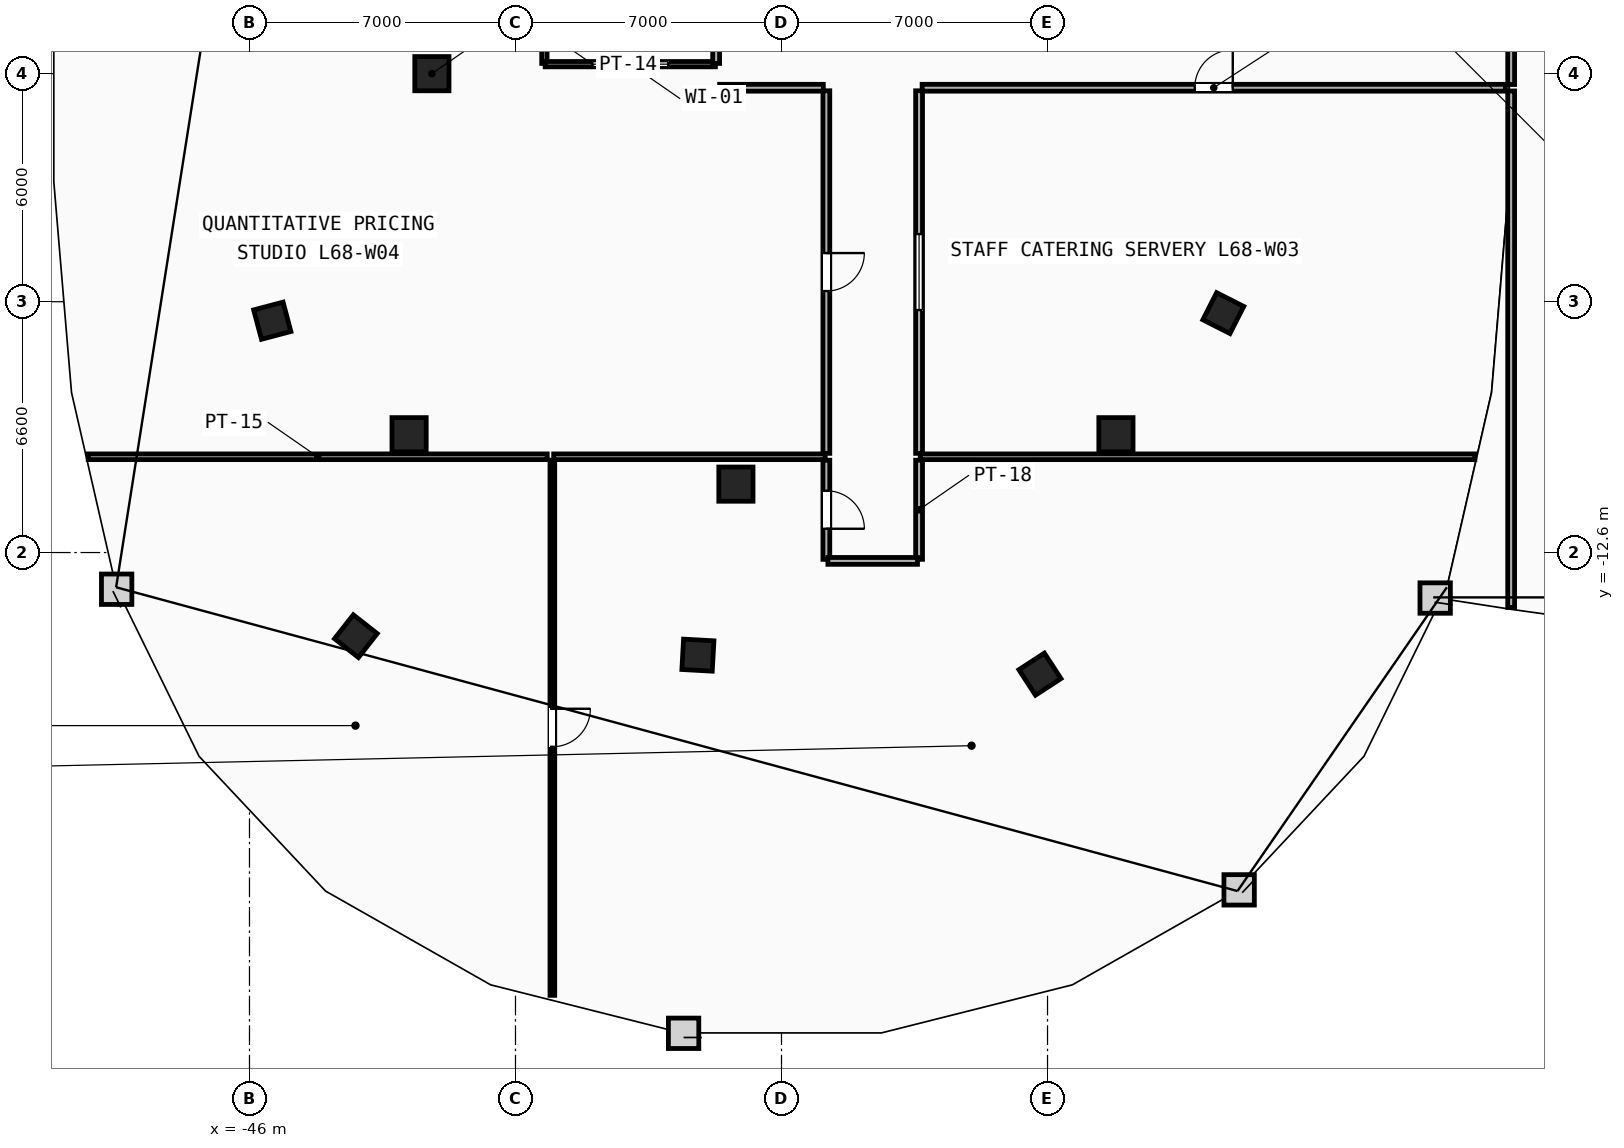
"""IFC4 building model, lengths in metres.
Left out: names, types, materials, properties, quantities, classifications, styles, units other than length and angle.
Written with IfcOpenShell. Run it as: python <this file> out.ifc"""

import sys

from ifc_helpers import new_model, si_unit, direction, frame, frame_2d, origin, origin_2d, place, context, subcontext, project, spatial, rectangle, extrude, element, fill, save


model = new_model("IFC4")
c1 = context("Model", 3, precision=1e-05, world=origin(), true_north=direction((0.0, 1.0)))
c2 = subcontext(c1, "Body", "Model", "MODEL_VIEW")
j1 = project(units=[si_unit("LENGTHUNIT", "METRE"), si_unit("PLANEANGLEUNIT", "RADIAN")], contexts=[c1])
p1 = place(None, origin())
s1 = spatial("IfcSite", under=j1, at=p1, CompositionType="ELEMENT")
p2 = place(p1, origin())
s2 = spatial("IfcBuilding", under=s1, at=p2, CompositionType="ELEMENT")
p3 = place(p2, frame((0.0, 0.0, 257.6)))
s3 = spatial("IfcBuildingStorey", under=s2, at=p3, CompositionType="ELEMENT", Elevation=257.6)
for number, where, z_axis, x_axis in (
    (1, (-41.2, 0.0, 0.0), (0.0, 0.0, 1.0), (1.0, 0.0, 0.0)),
    (2, (-41.8, -9.5, 0.0), (0.0, 0.0, 1.0), (1.0, 0.0, 0.0)),
    (3, (-33.2, -10.8, 0.0), (0.0, 0.0, 1.0), (1.0, 0.0, 0.0)),
    (4, (-23.2, -9.5, 0.0), (0.0, 0.0, 1.0), (1.0, 0.0, 0.0)),
):
    element("IfcColumn", number, at=place(p3, frame(where, z_axis=z_axis, x_axis=x_axis)), inside=s3, PredefinedType="COLUMN", context=c2, shape_type="SweptSolid", body=[
        extrude(rectangle(XDim=0.9, YDim=0.9, at=origin_2d()), origin(), (0.0, 0.0, 1.0), 3.6),
    ])
for number, where, z_axis, x_axis in (
    (5, (-45.4, -6.5, 0.0), (0.0, 0.0, 1.0), (0.256, -0.967, 0.0)),
    (6, (-43.2, -14.8, 0.0), (0.0, 0.0, 1.0), (0.786, -0.618, 0.0)),
    (7, (-34.2, -15.3, 0.0), (0.0, 0.0, 1.0), (0.998, -0.055, 0.0)),
    (8, (-25.2, -15.8, 0.0), (0.0, 0.0, 1.0), (0.838, 0.546, 0.0)),
    (9, (-20.375, -6.3, 0.0), (0.0, 0.0, 1.0), (0.453, 0.892, 0.0)),
):
    element("IfcColumn", number, at=place(p3, frame(where, z_axis=z_axis, x_axis=x_axis)), inside=s3, PredefinedType="COLUMN", context=c2, shape_type="SweptSolid", body=[
        extrude(rectangle(XDim=0.8, YDim=0.8, at=origin_2d()), origin(), (0.0, 0.0, 1.0), 3.6),
    ])
p4 = place(p3, frame((-38.24, 0.27, 0.0), z_axis=(0.0, 0.0, 1.0), x_axis=(0.0, 1.0, 0.0)))
e10 = element("IfcWall", 10, at=p4, inside=s3, PredefinedType="PARTITIONING", context=c2, shape_type="SweptSolid", body=[
    extrude(rectangle(XDim=1.715, YDim=0.14, at=frame_2d((0.857, 0.0))), origin(), (0.0, 0.0, 1.0), 3.34),
])
p5 = place(p3, frame((-38.22, 0.25, 0.0), z_axis=(0.0, 0.0, 1.0), x_axis=(1.0, 0.0, 0.0)))
e11 = element("IfcWall", 11, at=p5, inside=s3, PredefinedType="PARTITIONING", context=c2, shape_type="SweptSolid", body=[
    extrude(rectangle(XDim=4.48, YDim=0.14, at=frame_2d((2.24, 0.0))), origin(), (0.0, 0.0, 1.0), 3.34),
])
p6 = place(p5, frame((1.24, 0.0, 1.05)))
e12 = element("IfcOpeningElement", 12, at=p6, cuts=e11, PredefinedType="OPENING", context=c2, shape_type="SweptSolid", body=[
    extrude(rectangle(XDim=2.0, YDim=1.5, at=frame_2d((1.0, 0.75))), frame((0.0, 0.08, 0.0), z_axis=(0.0, -1.0, 0.0), x_axis=(1.0, 0.0, 0.0)), (0.0, 0.0, 1.0), 0.16),
])
p7 = place(p3, frame((-33.72, 0.27, 0.0), z_axis=(0.0, 0.0, 1.0), x_axis=(0.0, 1.0, 0.0)))
e13 = element("IfcWall", 13, at=p7, inside=s3, PredefinedType="PARTITIONING", context=c2, shape_type="SweptSolid", body=[
    extrude(rectangle(XDim=4.26, YDim=0.18, at=frame_2d((2.13, 0.0))), origin(), (0.0, 0.0, 1.0), 3.34),
])
p8 = place(p7, frame((1.655, 0.0, 0.0)))
e14 = element("IfcOpeningElement", 14, at=p8, cuts=e13, PredefinedType="OPENING", context=c2, shape_type="SweptSolid", body=[
    extrude(rectangle(XDim=0.95, YDim=2.1, at=frame_2d((0.475, 1.05))), frame((0.0, 0.1, 0.0), z_axis=(0.0, -1.0, 0.0), x_axis=(1.0, 0.0, 0.0)), (0.0, 0.0, 1.0), 0.2),
])
p9 = place(p3, frame((-50.245, -10.08, 0.0), z_axis=(0.0, 0.0, 1.0), x_axis=(1.0, 0.0, 0.0)))
e15 = element("IfcWall", 15, at=p9, inside=s3, PredefinedType="PARTITIONING", context=c2, shape_type="SweptSolid", body=[
    extrude(rectangle(XDim=12.08, YDim=0.15, at=frame_2d((6.04, 0.0))), origin(), (0.0, 0.0, 1.0), 2.724),
])
p10 = place(p3, frame((-37.995, -10.08, 0.0), z_axis=(0.0, 0.0, 1.0), x_axis=(1.0, 0.0, 0.0)))
e16 = element("IfcWall", 16, at=p10, inside=s3, PredefinedType="PARTITIONING", context=c2, shape_type="SweptSolid", body=[
    extrude(rectangle(XDim=7.145, YDim=0.15, at=frame_2d((3.573, 0.0))), origin(), (0.0, 0.0, 1.0), 2.724),
])
p11 = place(p3, frame((-28.35, -10.08, 0.0), z_axis=(0.0, 0.0, 1.0), x_axis=(1.0, 0.0, 0.0)))
e17 = element("IfcWall", 17, at=p11, inside=s3, PredefinedType="PARTITIONING", context=c2, shape_type="SweptSolid", body=[
    extrude(rectangle(XDim=14.595, YDim=0.15, at=frame_2d((7.297, 0.0))), origin(), (0.0, 0.0, 1.0), 2.724),
])
p12 = place(p3, frame((-30.82, -10.17, 0.0), z_axis=(0.0, 0.0, 1.0), x_axis=(0.0, -1.0, 0.0)))
e18 = element("IfcWall", 18, at=p12, inside=s3, PredefinedType="PARTITIONING", context=c2, shape_type="SweptSolid", body=[
    extrude(rectangle(XDim=2.609, YDim=0.18, at=frame_2d((1.304, 0.0))), origin(), (0.0, 0.0, 1.0), 3.34),
])
p13 = place(p12, frame((0.804, 0.0, 0.0)))
e19 = element("IfcOpeningElement", 19, at=p13, cuts=e18, PredefinedType="OPENING", context=c2, shape_type="SweptSolid", body=[
    extrude(rectangle(XDim=1.0, YDim=2.15, at=frame_2d((0.5, 1.075))), frame((0.0, 0.1, 0.0), z_axis=(0.0, -1.0, 0.0), x_axis=(1.0, 0.0, 0.0)), (0.0, 0.0, 1.0), 0.2),
])
p14 = place(p3, frame((-28.38, -12.779, 0.0), z_axis=(0.0, 0.0, 1.0), x_axis=(0.0, 1.0, 0.0)))
e20 = element("IfcWall", 20, at=p14, inside=s3, PredefinedType="PARTITIONING", context=c2, shape_type="SweptSolid", body=[
    extrude(rectangle(XDim=2.609, YDim=0.18, at=frame_2d((1.304, 0.0))), origin(), (0.0, 0.0, 1.0), 3.34),
])
p15 = place(p3, frame((-30.779, -12.82, 0.0), z_axis=(0.0, 0.0, 1.0), x_axis=(1.0, 0.0, 0.0)))
e21 = element("IfcWall", 21, at=p15, inside=s3, PredefinedType="PARTITIONING", context=c2, shape_type="SweptSolid", body=[
    extrude(rectangle(XDim=2.357, YDim=0.18, at=frame_2d((1.179, 0.0))), origin(), (0.0, 0.0, 1.0), 3.34),
])
p16 = place(p3, frame((-28.3, -0.37, 0.0), z_axis=(0.0, 0.0, 1.0), x_axis=(1.0, 0.0, 0.0)))
e22 = element("IfcWall", 22, at=p16, inside=s3, PredefinedType="PARTITIONING", context=c2, shape_type="SweptSolid", body=[
    extrude(rectangle(XDim=15.349, YDim=0.18, at=frame_2d((7.675, 0.0))), origin(), (0.0, 0.0, 1.0), 3.34),
])
p17 = place(p16, frame((7.175, 0.0, 0.0)))
e23 = element("IfcOpeningElement", 23, at=p17, cuts=e22, PredefinedType="OPENING", context=c2, shape_type="SweptSolid", body=[
    extrude(rectangle(XDim=1.0, YDim=2.15, at=frame_2d((0.5, 1.075))), frame((0.0, 0.1, 0.0), z_axis=(0.0, -1.0, 0.0), x_axis=(1.0, 0.0, 0.0)), (0.0, 0.0, 1.0), 0.2),
])
p18 = place(p3, frame((-28.38, -9.99, 0.0), z_axis=(0.0, 0.0, 1.0), x_axis=(0.0, 1.0, 0.0)))
e24 = element("IfcWall", 24, at=p18, inside=s3, PredefinedType="PARTITIONING", context=c2, shape_type="SweptSolid", body=[
    extrude(rectangle(XDim=9.54, YDim=0.18, at=frame_2d((4.77, 0.0))), origin(), (0.0, 0.0, 1.0), 3.34),
])
p19 = place(p18, frame((3.77, 0.0, 1.05)))
e25 = element("IfcOpeningElement", 25, at=p19, cuts=e24, PredefinedType="OPENING", context=c2, shape_type="SweptSolid", body=[
    extrude(rectangle(XDim=2.0, YDim=1.5, at=frame_2d((1.0, 0.75))), frame((0.0, 0.1, 0.0), z_axis=(0.0, -1.0, 0.0), x_axis=(1.0, 0.0, 0.0)), (0.0, 0.0, 1.0), 0.2),
])
p20 = place(p3, frame((-30.82, -0.45, 0.0), z_axis=(0.0, 0.0, 1.0), x_axis=(0.0, -1.0, 0.0)))
e26 = element("IfcWall", 26, at=p20, inside=s3, PredefinedType="PARTITIONING", context=c2, shape_type="SweptSolid", body=[
    extrude(rectangle(XDim=9.54, YDim=0.18, at=frame_2d((4.77, 0.0))), origin(), (0.0, 0.0, 1.0), 3.34),
])
p21 = place(p20, frame((4.27, 0.0, 0.0)))
e27 = element("IfcOpeningElement", 27, at=p21, cuts=e26, PredefinedType="OPENING", context=c2, shape_type="SweptSolid", body=[
    extrude(rectangle(XDim=1.0, YDim=2.15, at=frame_2d((0.5, 1.075))), frame((0.0, 0.1, 0.0), z_axis=(0.0, -1.0, 0.0), x_axis=(1.0, 0.0, 0.0)), (0.0, 0.0, 1.0), 0.2),
])
p22 = place(p3, frame((-33.628, -0.37, 0.0), z_axis=(0.0, 0.0, 1.0), x_axis=(1.0, 0.0, 0.0)))
e28 = element("IfcWall", 28, at=p22, inside=s3, PredefinedType="PARTITIONING", context=c2, shape_type="SweptSolid", body=[
    extrude(rectangle(XDim=2.729, YDim=0.18, at=frame_2d((1.364, 0.0))), origin(), (0.0, 0.0, 1.0), 3.34),
])
p23 = place(p3, frame((-38.03, -10.17, 0.0), z_axis=(0.0, 0.0, 1.0), x_axis=(0.0, -1.0, 0.0)))
e29 = element("IfcWall", 29, at=p23, inside=s3, PredefinedType="PARTITIONING", context=c2, shape_type="SweptSolid", body=[
    extrude(rectangle(XDim=14.081, YDim=0.125, at=frame_2d((7.041, 0.0))), origin(), (0.0, 0.0, 1.0), 3.34),
])
p24 = place(p23, frame((6.541, 0.0, 0.0)))
e30 = element("IfcOpeningElement", 30, at=p24, cuts=e29, PredefinedType="OPENING", context=c2, shape_type="SweptSolid", body=[
    extrude(rectangle(XDim=1.0, YDim=2.15, at=frame_2d((0.5, 1.075))), frame((0.0, 0.073, 0.0), z_axis=(0.0, -1.0, 0.0), x_axis=(1.0, 0.0, 0.0)), (0.0, 0.0, 1.0), 0.145),
])
p25 = place(p3, frame((-12.8, -14.044, 0.0), z_axis=(0.0, 0.0, 1.0), x_axis=(0.0, 1.0, 0.0)))
e31 = element("IfcWall", 31, at=p25, inside=s3, PredefinedType="PARTITIONING", context=c2, shape_type="SweptSolid", body=[
    extrude(rectangle(XDim=13.589, YDim=0.18, at=frame_2d((6.794, 0.0))), origin(), (0.0, 0.0, 1.0), 3.34),
])
p26 = place(p3, frame((-12.8, -0.285, 0.0), z_axis=(0.0, 0.0, 1.0), x_axis=(0.0, 1.0, 0.0)))
e32 = element("IfcWall", 32, at=p26, inside=s3, PredefinedType="PARTITIONING", context=c2, shape_type="SweptSolid", body=[
    extrude(rectangle(XDim=1.445, YDim=0.18, at=frame_2d((0.722, 0.0))), origin(), (0.0, 0.0, 1.0), 3.34),
])
p27 = place(p17, origin())
e33 = element("IfcDoor", 33, at=p27, inside=s3, OperationType="SINGLE_SWING_RIGHT", PredefinedType="DOOR", context=c2, shape_type="SweptSolid", body=[
    extrude(rectangle(XDim=1.0, YDim=2.15, at=frame_2d((0.5, 1.075))), frame((0.0, 0.025, 0.0), z_axis=(0.0, -1.0, 0.0), x_axis=(1.0, 0.0, 0.0)), (0.0, 0.0, 1.0), 0.05),
])
fill(e23, e33)
p28 = place(p24, origin())
e34 = element("IfcDoor", 34, at=p28, inside=s3, OperationType="SINGLE_SWING_LEFT", PredefinedType="DOOR", context=c2, shape_type="SweptSolid", body=[
    extrude(rectangle(XDim=1.0, YDim=2.15, at=frame_2d((0.5, 1.075))), frame((0.0, 0.025, 0.0), z_axis=(0.0, -1.0, 0.0), x_axis=(1.0, 0.0, 0.0)), (0.0, 0.0, 1.0), 0.05),
])
fill(e30, e34)
p29 = place(p21, origin())
e35 = element("IfcDoor", 35, at=p29, inside=s3, OperationType="SINGLE_SWING_LEFT", PredefinedType="DOOR", context=c2, shape_type="SweptSolid", body=[
    extrude(rectangle(XDim=1.0, YDim=2.15, at=frame_2d((0.5, 1.075))), frame((0.0, 0.025, 0.0), z_axis=(0.0, -1.0, 0.0), x_axis=(1.0, 0.0, 0.0)), (0.0, 0.0, 1.0), 0.05),
])
fill(e27, e35)
p30 = place(p13, origin())
e36 = element("IfcDoor", 36, at=p30, inside=s3, OperationType="SINGLE_SWING_RIGHT", PredefinedType="DOOR", context=c2, shape_type="SweptSolid", body=[
    extrude(rectangle(XDim=1.0, YDim=2.15, at=frame_2d((0.5, 1.075))), frame((0.0, 0.025, 0.0), z_axis=(0.0, -1.0, 0.0), x_axis=(1.0, 0.0, 0.0)), (0.0, 0.0, 1.0), 0.05),
])
fill(e19, e36)
p31 = place(p6, origin())
e37 = element("IfcWindow", 37, at=p31, inside=s3, PartitioningType="SINGLE_PANEL", PredefinedType="WINDOW", context=c2, shape_type="SweptSolid", body=[
    extrude(rectangle(XDim=2.0, YDim=1.5, at=frame_2d((1.0, 0.75))), frame((0.0, 0.03, 0.0), z_axis=(0.0, -1.0, 0.0), x_axis=(1.0, 0.0, 0.0)), (0.0, 0.0, 1.0), 0.06),
])
fill(e12, e37)
p32 = place(p19, origin())
e38 = element("IfcWindow", 38, at=p32, inside=s3, PartitioningType="SINGLE_PANEL", PredefinedType="WINDOW", context=c2, shape_type="SweptSolid", body=[
    extrude(rectangle(XDim=2.0, YDim=1.5, at=frame_2d((1.0, 0.75))), frame((0.0, 0.03, 0.0), z_axis=(0.0, -1.0, 0.0), x_axis=(1.0, 0.0, 0.0)), (0.0, 0.0, 1.0), 0.06),
])
fill(e25, e38)
save(model, sys.argv[1])
